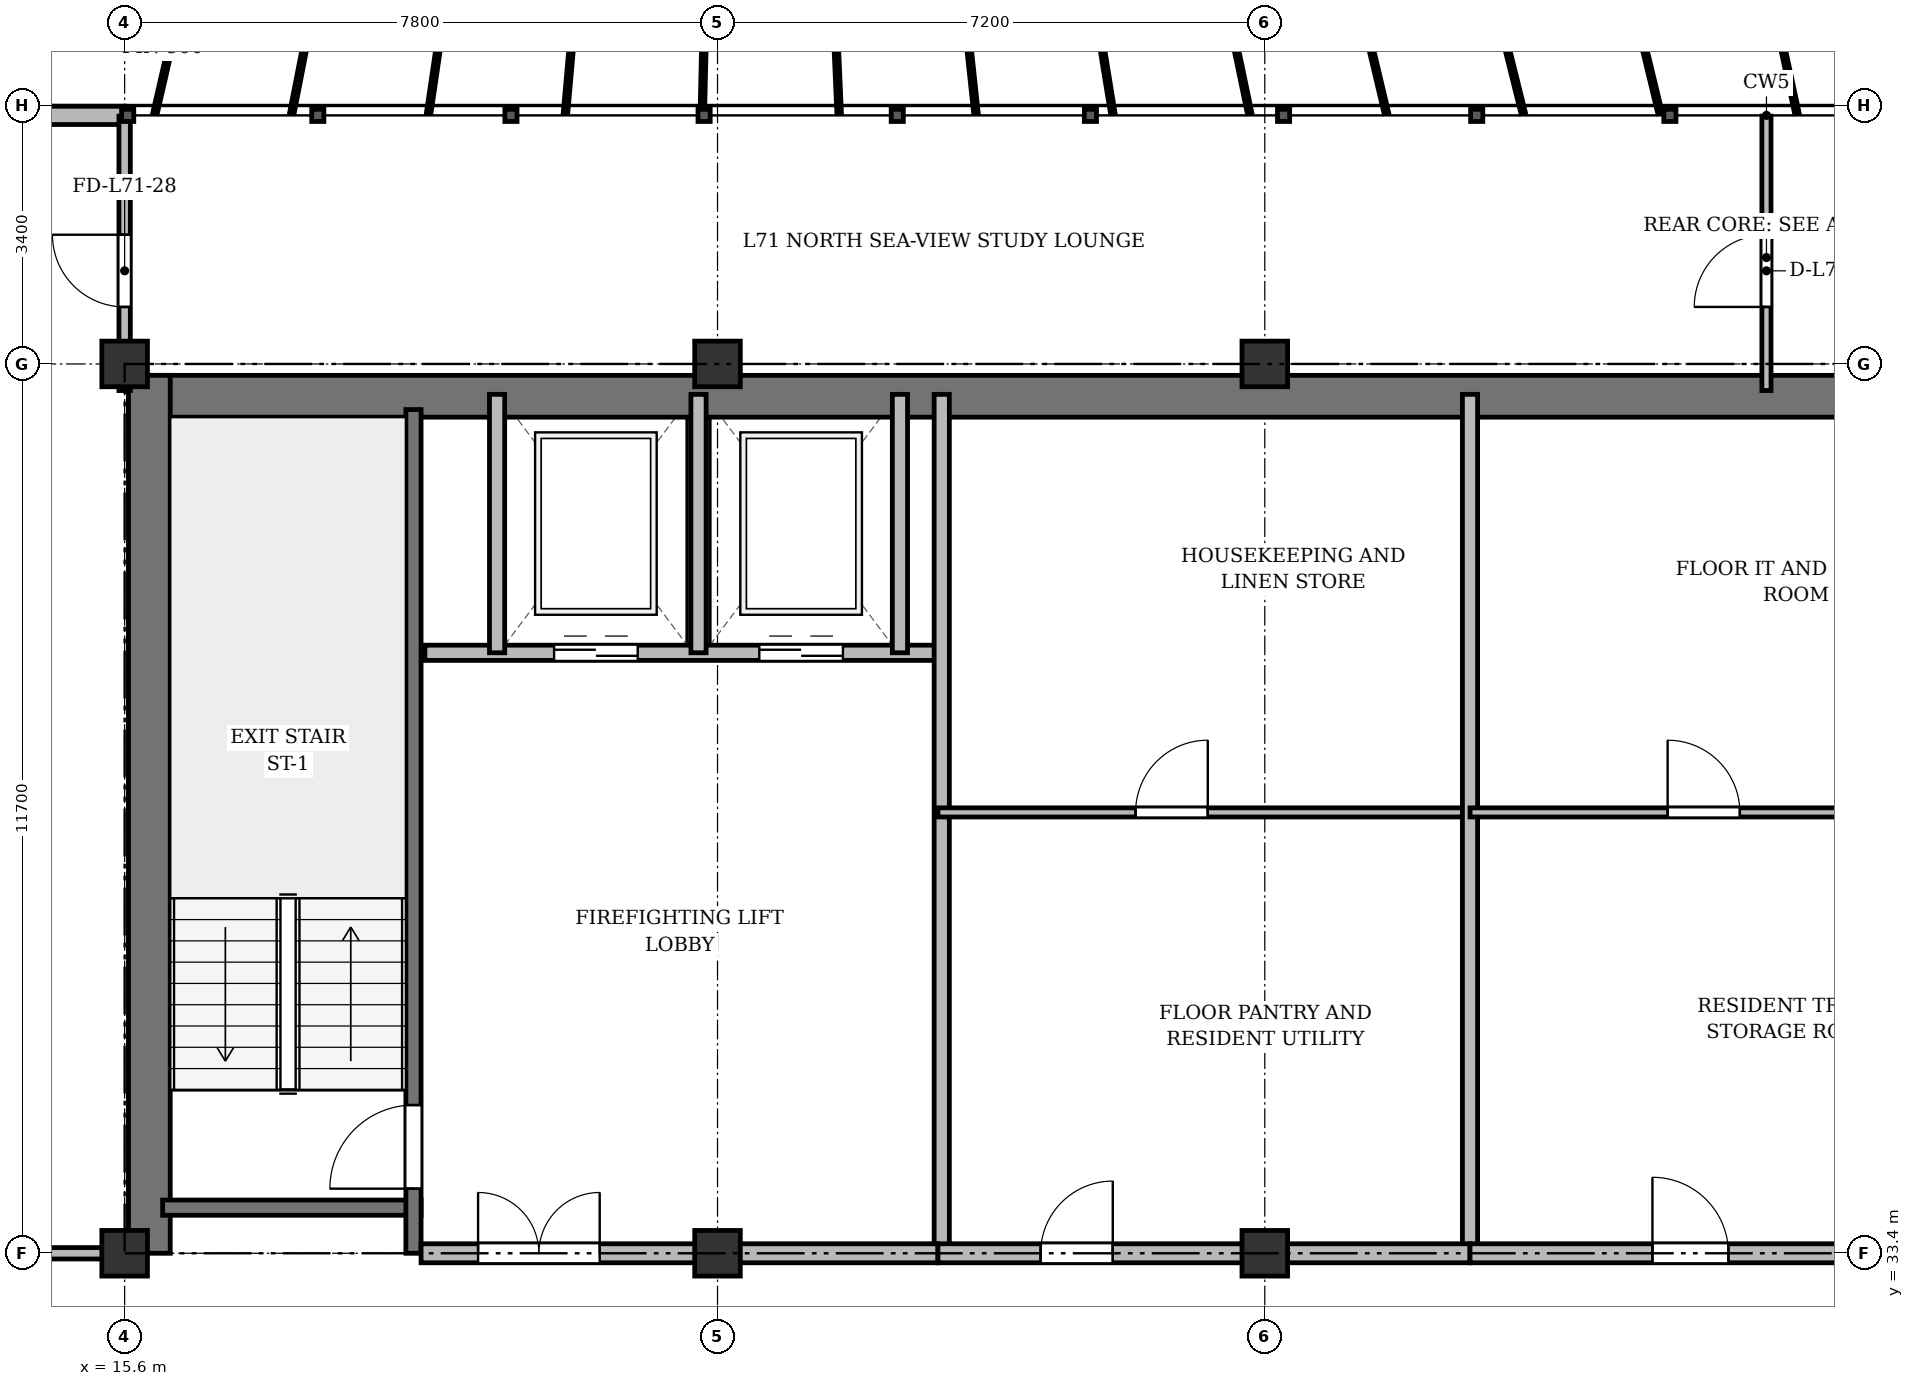
"""IFC4 building model, lengths in metres.
Left out: names, types, materials, properties, quantities, classifications, styles, units other than length and angle.
Written with IfcOpenShell. Run it as: python <this file> out.ifc"""

import sys

from ifc_helpers import new_model, si_unit, direction, frame, frame_2d, origin, origin_2d, place, context, subcontext, project, spatial, rectangle, extrude, source, transform, mapped, element, fill, save


model = new_model("IFC4")
c1 = context("Model", 3, precision=1e-05, world=origin(), true_north=direction((0.0, 1.0)))
c2 = subcontext(c1, "Body", "Model", "MODEL_VIEW")
j1 = project(units=[si_unit("LENGTHUNIT", "METRE"), si_unit("PLANEANGLEUNIT", "RADIAN")], contexts=[c1])
p1 = place(None, origin())
s1 = spatial("IfcSite", under=j1, at=p1, CompositionType="ELEMENT")
p2 = place(p1, origin())
s2 = spatial("IfcBuilding", under=s1, at=p2, CompositionType="ELEMENT")
p3 = place(p2, frame((0.0, 0.0, 273.9)))
s3 = spatial("IfcBuildingStorey", under=s2, at=p3, CompositionType="ELEMENT", Elevation=273.9)
m1 = source(origin(), c2, "Body", "SweptSolid", [
    extrude(rectangle(XDim=0.6, YDim=0.6, at=origin_2d()), origin(), (0.0, 0.0, 1.0), 3.6),
])
for number, where, z_axis, x_axis in (
    (1, (15.6, 33.4, 0.0), (0.0, 0.0, 1.0), (1.0, 0.0, 0.0)),
    (2, (15.6, 45.1, 0.0), (0.0, 0.0, 1.0), (1.0, 0.0, 0.0)),
    (3, (23.4, 33.4, 0.0), (0.0, 0.0, 1.0), (1.0, 0.0, 0.0)),
    (4, (23.4, 45.1, 0.0), (0.0, 0.0, 1.0), (1.0, 0.0, 0.0)),
    (5, (30.6, 33.4, 0.0), (0.0, 0.0, 1.0), (1.0, 0.0, 0.0)),
    (6, (30.6, 45.1, 0.0), (0.0, 0.0, 1.0), (1.0, 0.0, 0.0)),
):
    element("IfcColumn", number, at=place(p3, frame(where, z_axis=z_axis, x_axis=x_axis)), inside=s3, PredefinedType="COLUMN", context=c2, shape_type="MappedRepresentation", body=[
        mapped(m1, transform((0.0, 0.0, 0.0), x_axis=(1.0, 0.0, 0.0), y_axis=(0.0, 1.0, 0.0), z_axis=(0.0, 0.0, 1.0), scale=1.0)),
    ])
p4 = place(p3, frame((11.3, 48.37, 0.0), z_axis=(0.0, 0.0, 1.0), x_axis=(1.0, 0.0, 0.0)))
e7 = element("IfcWall", 7, at=p4, inside=s3, PredefinedType="SOLIDWALL", context=c2, shape_type="SweptSolid", body=[
    extrude(rectangle(XDim=4.3, YDim=0.24, at=frame_2d((2.15, 0.0))), origin(), (0.0, 0.0, 1.0), 3.37),
])
p5 = place(p4, frame((1.475, 0.0, 0.9)))
e8 = element("IfcOpeningElement", 8, at=p5, cuts=e7, PredefinedType="OPENING", context=c2, shape_type="SweptSolid", body=[
    extrude(rectangle(XDim=1.35, YDim=1.5, at=frame_2d((0.675, 0.75))), frame((0.0, 0.13, 0.0), z_axis=(0.0, -1.0, 0.0), x_axis=(1.0, 0.0, 0.0)), (0.0, 0.0, 1.0), 0.26),
])
p6 = place(p3, frame((15.65, 44.675, 0.0), z_axis=(0.0, 0.0, 1.0), x_axis=(1.0, 0.0, 0.0)))
e9 = element("IfcWall", 9, at=p6, inside=s3, PredefinedType="SHEAR", context=c2, shape_type="SweptSolid", body=[
    extrude(rectangle(XDim=43.1, YDim=0.55, at=frame_2d((21.55, 0.0))), origin(), (0.0, 0.0, 1.0), 3.37),
])
p7 = place(p3, frame((15.925, 33.4, 0.0), z_axis=(0.0, 0.0, 1.0), x_axis=(0.0, 1.0, 0.0)))
e10 = element("IfcWall", 10, at=p7, inside=s3, PredefinedType="SHEAR", context=c2, shape_type="SweptSolid", body=[
    extrude(rectangle(XDim=11.55, YDim=0.55, at=frame_2d((5.775, 0.0))), origin(), (0.0, 0.0, 1.0), 3.37),
])
p8 = place(p3, frame((16.1, 34.0, 0.0), z_axis=(0.0, 0.0, 1.0), x_axis=(1.0, 0.0, 0.0)))
e11 = element("IfcWall", 11, at=p8, inside=s3, PredefinedType="SHEAR", context=c2, shape_type="SweptSolid", body=[
    extrude(rectangle(XDim=3.4, YDim=0.2, at=frame_2d((1.7, 0.0))), origin(), (0.0, 0.0, 1.0), 3.37),
])
p9 = place(p3, frame((19.4, 33.4, 0.0), z_axis=(0.0, 0.0, 1.0), x_axis=(0.0, 1.0, 0.0)))
e12 = element("IfcWall", 12, at=p9, inside=s3, PredefinedType="SHEAR", context=c2, shape_type="SweptSolid", body=[
    extrude(rectangle(XDim=11.1, YDim=0.2, at=frame_2d((5.55, 0.0))), origin(), (0.0, 0.0, 1.0), 3.37),
])
p10 = place(p9, frame((0.85, 0.0, 0.0)))
e13 = element("IfcOpeningElement", 13, at=p10, cuts=e12, PredefinedType="OPENING", context=c2, shape_type="SweptSolid", body=[
    extrude(rectangle(XDim=1.1, YDim=2.15, at=frame_2d((0.55, 1.075))), frame((0.0, 0.11, 0.0), z_axis=(0.0, -1.0, 0.0), x_axis=(1.0, 0.0, 0.0)), (0.0, 0.0, 1.0), 0.22),
])
p11 = place(p3, frame((19.55, 41.3, 0.0), z_axis=(0.0, 0.0, 1.0), x_axis=(1.0, 0.0, 0.0)))
e14 = element("IfcWall", 14, at=p11, inside=s3, PredefinedType="SOLIDWALL", context=c2, shape_type="SweptSolid", body=[
    extrude(rectangle(XDim=6.75, YDim=0.2, at=frame_2d((3.375, 0.0))), origin(), (0.0, 0.0, 1.0), 3.37),
])
p12 = place(p11, frame((1.7, 0.0, 0.0)))
e15 = element("IfcOpeningElement", 15, at=p12, cuts=e14, PredefinedType="OPENING", context=c2, shape_type="SweptSolid", body=[
    extrude(rectangle(XDim=1.1, YDim=2.15, at=frame_2d((0.55, 1.075))), frame((0.0, 0.11, 0.0), z_axis=(0.0, -1.0, 0.0), x_axis=(1.0, 0.0, 0.0)), (0.0, 0.0, 1.0), 0.22),
])
p13 = place(p11, frame((4.4, 0.0, 0.0)))
e16 = element("IfcOpeningElement", 16, at=p13, cuts=e14, PredefinedType="OPENING", context=c2, shape_type="SweptSolid", body=[
    extrude(rectangle(XDim=1.1, YDim=2.15, at=frame_2d((0.55, 1.075))), frame((0.0, 0.11, 0.0), z_axis=(0.0, -1.0, 0.0), x_axis=(1.0, 0.0, 0.0)), (0.0, 0.0, 1.0), 0.22),
])
for number, where, z_axis, x_axis in (
    (17, (20.5, 41.3, 0.0), (0.0, 0.0, 1.0), (0.0, 1.0, 0.0)),
    (18, (23.15, 41.3, 0.0), (0.0, 0.0, 1.0), (0.0, 1.0, 0.0)),
    (19, (25.8, 41.3, 0.0), (0.0, 0.0, 1.0), (0.0, 1.0, 0.0)),
):
    element("IfcWall", number, at=place(p3, frame(where, z_axis=z_axis, x_axis=x_axis)), inside=s3, PredefinedType="SOLIDWALL", context=c2, shape_type="SweptSolid", body=[
        extrude(rectangle(XDim=3.4, YDim=0.2, at=frame_2d((1.7, 0.0))), origin(), (0.0, 0.0, 1.0), 3.37),
    ])
p14 = place(p3, frame((26.35, 33.4, 0.0), z_axis=(0.0, 0.0, 1.0), x_axis=(0.0, 1.0, 0.0)))
e20 = element("IfcWall", 20, at=p14, inside=s3, PredefinedType="SOLIDWALL", context=c2, shape_type="SweptSolid", body=[
    extrude(rectangle(XDim=11.3, YDim=0.2, at=frame_2d((5.65, 0.0))), origin(), (0.0, 0.0, 1.0), 2.92),
])
p15 = place(p3, frame((19.5, 33.4, 0.0), z_axis=(0.0, 0.0, 1.0), x_axis=(1.0, 0.0, 0.0)))
e21 = element("IfcWall", 21, at=p15, inside=s3, PredefinedType="PARTITIONING", context=c2, shape_type="SweptSolid", body=[
    extrude(rectangle(XDim=6.8, YDim=0.25, at=frame_2d((3.4, 0.0))), origin(), (0.0, 0.0, 1.0), 2.92),
])
p16 = place(p15, frame((0.75, 0.0, 0.0)))
e22 = element("IfcOpeningElement", 22, at=p16, cuts=e21, PredefinedType="OPENING", context=c2, shape_type="SweptSolid", body=[
    extrude(rectangle(XDim=1.6, YDim=2.2, at=frame_2d((0.8, 1.1))), frame((0.0, 0.135, 0.0), z_axis=(0.0, -1.0, 0.0), x_axis=(1.0, 0.0, 0.0)), (0.0, 0.0, 1.0), 0.27),
])
p17 = place(p3, frame((26.3, 39.2, 0.0), z_axis=(0.0, 0.0, 1.0), x_axis=(1.0, 0.0, 0.0)))
e23 = element("IfcWall", 23, at=p17, inside=s3, PredefinedType="PARTITIONING", context=c2, shape_type="SweptSolid", body=[
    extrude(rectangle(XDim=7.0, YDim=0.12, at=frame_2d((3.5, 0.0))), origin(), (0.0, 0.0, 1.0), 2.87),
])
p18 = place(p17, frame((2.6, 0.0, 0.0)))
e24 = element("IfcOpeningElement", 24, at=p18, cuts=e23, PredefinedType="OPENING", context=c2, shape_type="SweptSolid", body=[
    extrude(rectangle(XDim=0.95, YDim=2.15, at=frame_2d((0.475, 1.075))), frame((0.0, 0.07, 0.0), z_axis=(0.0, -1.0, 0.0), x_axis=(1.0, 0.0, 0.0)), (0.0, 0.0, 1.0), 0.14),
])
p19 = place(p3, frame((33.3, 33.4, 0.0), z_axis=(0.0, 0.0, 1.0), x_axis=(0.0, 1.0, 0.0)))
e25 = element("IfcWall", 25, at=p19, inside=s3, PredefinedType="SOLIDWALL", context=c2, shape_type="SweptSolid", body=[
    extrude(rectangle(XDim=11.3, YDim=0.2, at=frame_2d((5.65, 0.0))), origin(), (0.0, 0.0, 1.0), 2.92),
])
p20 = place(p3, frame((33.3, 39.2, 0.0), z_axis=(0.0, 0.0, 1.0), x_axis=(1.0, 0.0, 0.0)))
e26 = element("IfcWall", 26, at=p20, inside=s3, PredefinedType="PARTITIONING", context=c2, shape_type="SweptSolid", body=[
    extrude(rectangle(XDim=6.8, YDim=0.12, at=frame_2d((3.4, 0.0))), origin(), (0.0, 0.0, 1.0), 3.37),
])
p21 = place(p20, frame((2.6, 0.0, 0.0)))
e27 = element("IfcOpeningElement", 27, at=p21, cuts=e26, PredefinedType="OPENING", context=c2, shape_type="SweptSolid", body=[
    extrude(rectangle(XDim=0.95, YDim=2.15, at=frame_2d((0.475, 1.075))), frame((0.0, 0.07, 0.0), z_axis=(0.0, -1.0, 0.0), x_axis=(1.0, 0.0, 0.0)), (0.0, 0.0, 1.0), 0.14),
])
p22 = place(p3, frame((26.3, 33.4, 0.0), z_axis=(0.0, 0.0, 1.0), x_axis=(1.0, 0.0, 0.0)))
e28 = element("IfcWall", 28, at=p22, inside=s3, PredefinedType="PARTITIONING", context=c2, shape_type="SweptSolid", body=[
    extrude(rectangle(XDim=7.0, YDim=0.25, at=frame_2d((3.5, 0.0))), origin(), (0.0, 0.0, 1.0), 2.92),
])
p23 = place(p22, frame((1.35, 0.0, 0.0)))
e29 = element("IfcOpeningElement", 29, at=p23, cuts=e28, PredefinedType="OPENING", context=c2, shape_type="SweptSolid", body=[
    extrude(rectangle(XDim=0.95, YDim=2.15, at=frame_2d((0.475, 1.075))), frame((0.0, 0.135, 0.0), z_axis=(0.0, -1.0, 0.0), x_axis=(1.0, 0.0, 0.0)), (0.0, 0.0, 1.0), 0.27),
])
p24 = place(p3, frame((33.3, 33.4, 0.0), z_axis=(0.0, 0.0, 1.0), x_axis=(1.0, 0.0, 0.0)))
e30 = element("IfcWall", 30, at=p24, inside=s3, PredefinedType="PARTITIONING", context=c2, shape_type="SweptSolid", body=[
    extrude(rectangle(XDim=6.8, YDim=0.25, at=frame_2d((3.4, 0.0))), origin(), (0.0, 0.0, 1.0), 2.92),
])
p25 = place(p24, frame((2.4, 0.0, 0.0)))
e31 = element("IfcOpeningElement", 31, at=p25, cuts=e30, PredefinedType="OPENING", context=c2, shape_type="SweptSolid", body=[
    extrude(rectangle(XDim=1.0, YDim=2.15, at=frame_2d((0.5, 1.075))), frame((0.0, 0.135, 0.0), z_axis=(0.0, -1.0, 0.0), x_axis=(1.0, 0.0, 0.0)), (0.0, 0.0, 1.0), 0.27),
])
p26 = place(p3, frame((8.45, 33.4, 0.0), z_axis=(0.0, 0.0, 1.0), x_axis=(1.0, 0.0, 0.0)))
e32 = element("IfcWall", 32, at=p26, inside=s3, PredefinedType="PARTITIONING", context=c2, shape_type="SweptSolid", body=[
    extrude(rectangle(XDim=7.15, YDim=0.15, at=frame_2d((3.575, 0.0))), origin(), (0.0, 0.0, 1.0), 2.92),
])
p27 = place(p26, frame((3.0, 0.0, 0.0)))
e33 = element("IfcOpeningElement", 33, at=p27, cuts=e32, PredefinedType="OPENING", context=c2, shape_type="SweptSolid", body=[
    extrude(rectangle(XDim=0.95, YDim=2.15, at=frame_2d((0.475, 1.075))), frame((0.0, 0.085, 0.0), z_axis=(0.0, -1.0, 0.0), x_axis=(1.0, 0.0, 0.0)), (0.0, 0.0, 1.0), 0.17),
])
p28 = place(p3, frame((37.2, 44.75, 0.0), z_axis=(0.0, 0.0, 1.0), x_axis=(0.0, 1.0, 0.0)))
e34 = element("IfcWall", 34, at=p28, inside=s3, PredefinedType="PARTITIONING", context=c2, shape_type="SweptSolid", body=[
    extrude(rectangle(XDim=3.61, YDim=0.12, at=frame_2d((1.805, 0.0))), origin(), (0.0, 0.0, 1.0), 2.92),
])
p29 = place(p28, frame((1.1, 0.0, 0.0)))
e35 = element("IfcOpeningElement", 35, at=p29, cuts=e34, PredefinedType="OPENING", context=c2, shape_type="SweptSolid", body=[
    extrude(rectangle(XDim=0.95, YDim=2.15, at=frame_2d((0.475, 1.075))), frame((0.0, 0.07, 0.0), z_axis=(0.0, -1.0, 0.0), x_axis=(1.0, 0.0, 0.0)), (0.0, 0.0, 1.0), 0.14),
])
p30 = place(p3, frame((15.6, 44.75, 0.0), z_axis=(0.0, 0.0, 1.0), x_axis=(0.0, 1.0, 0.0)))
e36 = element("IfcWall", 36, at=p30, inside=s3, PredefinedType="PARTITIONING", context=c2, shape_type="SweptSolid", body=[
    extrude(rectangle(XDim=3.61, YDim=0.15, at=frame_2d((1.805, 0.0))), origin(), (0.0, 0.0, 1.0), 2.87),
])
p31 = place(p30, frame((1.1, 0.0, 0.0)))
e37 = element("IfcOpeningElement", 37, at=p31, cuts=e36, PredefinedType="OPENING", context=c2, shape_type="SweptSolid", body=[
    extrude(rectangle(XDim=0.95, YDim=2.15, at=frame_2d((0.475, 1.075))), frame((0.0, 0.085, 0.0), z_axis=(0.0, -1.0, 0.0), x_axis=(1.0, 0.0, 0.0)), (0.0, 0.0, 1.0), 0.17),
])
m2 = source(origin(), c2, "Body", "SweptSolid", [
    extrude(rectangle(XDim=1.1, YDim=2.15, at=frame_2d((0.55, 1.075))), frame((0.0, 0.025, 0.0), z_axis=(0.0, -1.0, 0.0), x_axis=(1.0, 0.0, 0.0)), (0.0, 0.0, 1.0), 0.05),
])
p32 = place(p10, origin())
e38 = element("IfcDoor", 38, at=p32, inside=s3, OperationType="SINGLE_SWING_LEFT", PredefinedType="DOOR", context=c2, shape_type="MappedRepresentation", body=[
    mapped(m2, transform((0.0, 0.0, 0.0), x_axis=(1.0, 0.0, 0.0), y_axis=(0.0, 1.0, 0.0), z_axis=(0.0, 0.0, 1.0), scale=1.0)),
])
fill(e13, e38)
p33 = place(p12, origin())
e39 = element("IfcDoor", 39, at=p33, inside=s3, OperationType="DOUBLE_DOOR_SLIDING", PredefinedType="DOOR", context=c2, shape_type="MappedRepresentation", body=[
    mapped(m2, transform((0.0, 0.0, 0.0), x_axis=(1.0, 0.0, 0.0), y_axis=(0.0, 1.0, 0.0), z_axis=(0.0, 0.0, 1.0), scale=1.0)),
])
fill(e15, e39)
p34 = place(p13, origin())
e40 = element("IfcDoor", 40, at=p34, inside=s3, OperationType="DOUBLE_DOOR_SLIDING", PredefinedType="DOOR", context=c2, shape_type="MappedRepresentation", body=[
    mapped(m2, transform((0.0, 0.0, 0.0), x_axis=(1.0, 0.0, 0.0), y_axis=(0.0, 1.0, 0.0), z_axis=(0.0, 0.0, 1.0), scale=1.0)),
])
fill(e16, e40)
m3 = source(origin(), c2, "Body", "SweptSolid", [
    extrude(rectangle(XDim=1.6, YDim=2.2, at=frame_2d((0.8, 1.1))), frame((0.0, 0.025, 0.0), z_axis=(0.0, -1.0, 0.0), x_axis=(1.0, 0.0, 0.0)), (0.0, 0.0, 1.0), 0.05),
])
p35 = place(p16, origin())
e41 = element("IfcDoor", 41, at=p35, inside=s3, OperationType="DOUBLE_DOOR_SINGLE_SWING", PredefinedType="DOOR", context=c2, shape_type="MappedRepresentation", body=[
    mapped(m3, transform((0.0, 0.0, 0.0), x_axis=(1.0, 0.0, 0.0), y_axis=(0.0, 1.0, 0.0), z_axis=(0.0, 0.0, 1.0), scale=1.0)),
])
fill(e22, e41)
m4 = source(origin(), c2, "Body", "SweptSolid", [
    extrude(rectangle(XDim=0.95, YDim=2.15, at=frame_2d((0.475, 1.075))), frame((0.0, 0.025, 0.0), z_axis=(0.0, -1.0, 0.0), x_axis=(1.0, 0.0, 0.0)), (0.0, 0.0, 1.0), 0.05),
])
p36 = place(p18, origin())
e42 = element("IfcDoor", 42, at=p36, inside=s3, OperationType="SINGLE_SWING_RIGHT", PredefinedType="DOOR", context=c2, shape_type="MappedRepresentation", body=[
    mapped(m4, transform((0.0, 0.0, 0.0), x_axis=(1.0, 0.0, 0.0), y_axis=(0.0, 1.0, 0.0), z_axis=(0.0, 0.0, 1.0), scale=1.0)),
])
fill(e24, e42)
p37 = place(p21, origin())
e43 = element("IfcDoor", 43, at=p37, inside=s3, OperationType="SINGLE_SWING_LEFT", PredefinedType="DOOR", context=c2, shape_type="MappedRepresentation", body=[
    mapped(m4, transform((0.0, 0.0, 0.0), x_axis=(1.0, 0.0, 0.0), y_axis=(0.0, 1.0, 0.0), z_axis=(0.0, 0.0, 1.0), scale=1.0)),
])
fill(e27, e43)
p38 = place(p23, origin())
e44 = element("IfcDoor", 44, at=p38, inside=s3, OperationType="SINGLE_SWING_RIGHT", PredefinedType="DOOR", context=c2, shape_type="MappedRepresentation", body=[
    mapped(m4, transform((0.0, 0.0, 0.0), x_axis=(1.0, 0.0, 0.0), y_axis=(0.0, 1.0, 0.0), z_axis=(0.0, 0.0, 1.0), scale=1.0)),
])
fill(e29, e44)
m5 = source(origin(), c2, "Body", "SweptSolid", [
    extrude(rectangle(XDim=1.0, YDim=2.15, at=frame_2d((0.5, 1.075))), frame((0.0, 0.025, 0.0), z_axis=(0.0, -1.0, 0.0), x_axis=(1.0, 0.0, 0.0)), (0.0, 0.0, 1.0), 0.05),
])
p39 = place(p25, origin())
e45 = element("IfcDoor", 45, at=p39, inside=s3, OperationType="SINGLE_SWING_LEFT", PredefinedType="DOOR", context=c2, shape_type="MappedRepresentation", body=[
    mapped(m5, transform((0.0, 0.0, 0.0), x_axis=(1.0, 0.0, 0.0), y_axis=(0.0, 1.0, 0.0), z_axis=(0.0, 0.0, 1.0), scale=1.0)),
])
fill(e31, e45)
p40 = place(p29, origin())
e46 = element("IfcDoor", 46, at=p40, inside=s3, OperationType="SINGLE_SWING_LEFT", PredefinedType="DOOR", context=c2, shape_type="MappedRepresentation", body=[
    mapped(m4, transform((0.0, 0.0, 0.0), x_axis=(1.0, 0.0, 0.0), y_axis=(0.0, 1.0, 0.0), z_axis=(0.0, 0.0, 1.0), scale=1.0)),
])
fill(e35, e46)
p41 = place(p31, origin())
e47 = element("IfcDoor", 47, at=p41, inside=s3, OperationType="SINGLE_SWING_RIGHT", PredefinedType="DOOR", context=c2, shape_type="MappedRepresentation", body=[
    mapped(m4, transform((0.0, 0.0, 0.0), x_axis=(1.0, 0.0, 0.0), y_axis=(0.0, 1.0, 0.0), z_axis=(0.0, 0.0, 1.0), scale=1.0)),
])
fill(e37, e47)
save(model, sys.argv[1])
